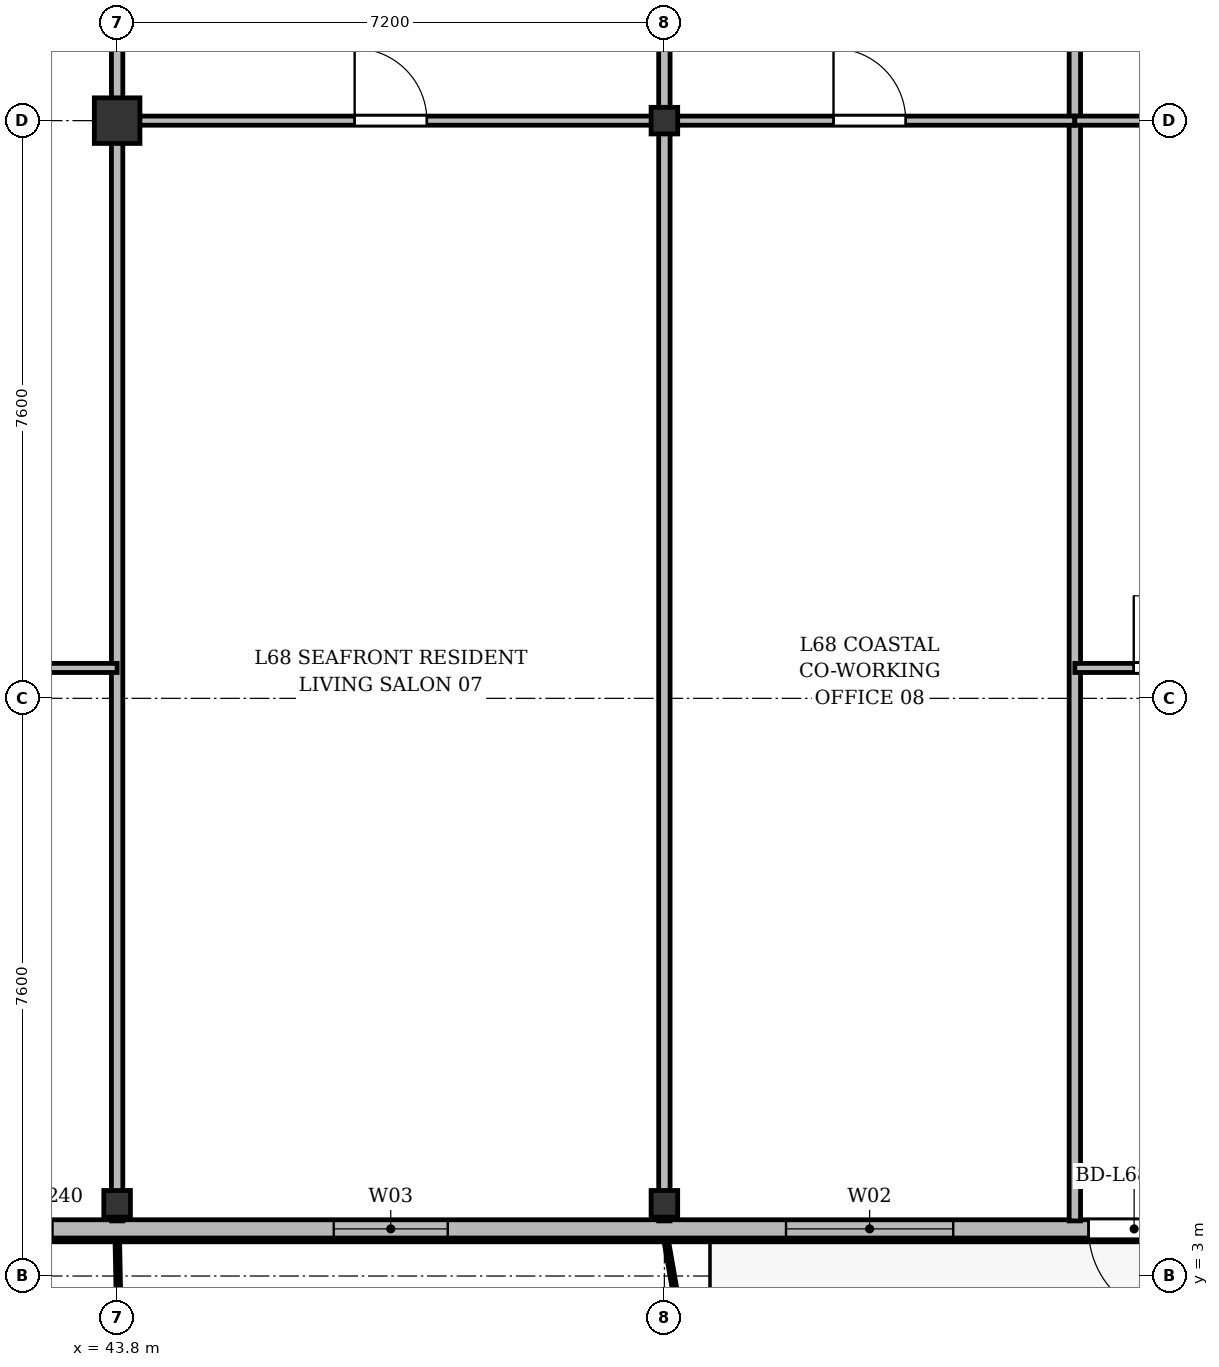
"""IFC4 building model, lengths in metres.
Left out: names, types, materials, properties, quantities, classifications, styles, units other than length and angle.
Written with IfcOpenShell. Run it as: python <this file> out.ifc"""

import sys

from ifc_helpers import new_model, si_unit, direction, frame, frame_2d, origin, origin_2d, place, context, subcontext, project, spatial, rectangle, i_section, extrude, source, transform, mapped, element, fill, save


model = new_model("IFC4")
c1 = context("Model", 3, precision=1e-05, world=origin(), true_north=direction((0.0, 1.0)))
c2 = subcontext(c1, "Body", "Model", "MODEL_VIEW")
j1 = project(units=[si_unit("LENGTHUNIT", "METRE"), si_unit("PLANEANGLEUNIT", "RADIAN")], contexts=[c1])
p1 = place(None, origin())
s1 = spatial("IfcSite", under=j1, at=p1, CompositionType="ELEMENT")
p2 = place(p1, origin())
s2 = spatial("IfcBuilding", under=s1, at=p2, CompositionType="ELEMENT")
p3 = place(p2, frame((0.0, 0.0, 263.1)))
s3 = spatial("IfcBuildingStorey", under=s2, at=p3, CompositionType="ELEMENT", Elevation=263.1)
m1 = source(origin(), c2, "Body", "SweptSolid", [
    extrude(i_section(OverallWidth=0.35, OverallDepth=0.35, WebThickness=0.018, FlangeThickness=0.028, at=origin_2d()), origin(), (0.0, 0.0, 1.0), 3.6),
])
p4 = place(p3, frame((43.8, 3.95, 0.0), z_axis=(0.0, 0.0, 1.0), x_axis=(1.0, 0.0, 0.0)))
e1 = element("IfcColumn", 1, at=p4, inside=s3, PredefinedType="COLUMN", context=c2, shape_type="MappedRepresentation", body=[
    mapped(m1, transform((0.0, 0.0, 0.0), x_axis=(1.0, 0.0, 0.0), y_axis=(0.0, 1.0, 0.0), z_axis=(0.0, 0.0, 1.0), scale=1.0)),
])
m2 = source(origin(), c2, "Body", "SweptSolid", [
    extrude(rectangle(XDim=0.6, YDim=0.6, at=origin_2d()), origin(), (0.0, 0.0, 1.0), 3.6),
])
p5 = place(p3, frame((43.8, 18.2, 0.0), z_axis=(0.0, 0.0, 1.0), x_axis=(1.0, 0.0, 0.0)))
e2 = element("IfcColumn", 2, at=p5, inside=s3, PredefinedType="COLUMN", context=c2, shape_type="MappedRepresentation", body=[
    mapped(m2, transform((0.0, 0.0, 0.0), x_axis=(1.0, 0.0, 0.0), y_axis=(0.0, 1.0, 0.0), z_axis=(0.0, 0.0, 1.0), scale=1.0)),
])
for number, where, z_axis, x_axis in (
    (3, (51.0, 3.95, 0.0), (0.0, 0.0, 1.0), (1.0, 0.0, 0.0)),
    (4, (51.0, 18.2, 0.0), (0.0, 0.0, 1.0), (1.0, 0.0, 0.0)),
):
    element("IfcColumn", number, at=place(p3, frame(where, z_axis=z_axis, x_axis=x_axis)), inside=s3, PredefinedType="COLUMN", context=c2, shape_type="MappedRepresentation", body=[
        mapped(m1, transform((0.0, 0.0, 0.0), x_axis=(1.0, 0.0, 0.0), y_axis=(0.0, 1.0, 0.0), z_axis=(0.0, 0.0, 1.0), scale=1.0)),
    ])
p6 = place(p3, frame((63.2, 3.62, 0.0), z_axis=(0.0, 0.0, 1.0), x_axis=(-1.0, 0.0, 0.0)))
e5 = element("IfcWall", 5, at=p6, inside=s3, PredefinedType="SOLIDWALL", context=c2, shape_type="SweptSolid", body=[
    extrude(rectangle(XDim=52.0, YDim=0.24, at=frame_2d((26.0, 0.0))), origin(), (0.0, 0.0, 1.0), 3.37),
])
p7 = place(p6, frame((0.345, 0.0, 0.9)))
e6 = element("IfcOpeningElement", 6, at=p7, cuts=e5, PredefinedType="OPENING", context=c2, shape_type="SweptSolid", body=[
    extrude(rectangle(XDim=1.2, YDim=1.65, at=frame_2d((0.6, 0.825))), frame((0.0, 0.13, 0.0), z_axis=(0.0, -1.0, 0.0), x_axis=(1.0, 0.0, 0.0)), (0.0, 0.0, 1.0), 0.26),
])
p8 = place(p6, frame((2.225, 0.0, 0.9)))
e7 = element("IfcOpeningElement", 7, at=p8, cuts=e5, PredefinedType="OPENING", context=c2, shape_type="SweptSolid", body=[
    extrude(rectangle(XDim=1.65, YDim=1.85, at=frame_2d((0.825, 0.925))), frame((0.0, 0.13, 0.0), z_axis=(0.0, -1.0, 0.0), x_axis=(1.0, 0.0, 0.0)), (0.0, 0.0, 1.0), 0.26),
])
p9 = place(p6, frame((5.42, 0.0, 0.0)))
e8 = element("IfcOpeningElement", 8, at=p9, cuts=e5, PredefinedType="OPENING", context=c2, shape_type="SweptSolid", body=[
    extrude(rectangle(XDim=1.2, YDim=2.2, at=frame_2d((0.6, 1.1))), frame((0.0, 0.13, 0.0), z_axis=(0.0, -1.0, 0.0), x_axis=(1.0, 0.0, 0.0)), (0.0, 0.0, 1.0), 0.26),
])
p10 = place(p6, frame((8.4, 0.0, 0.9)))
e9 = element("IfcOpeningElement", 9, at=p10, cuts=e5, PredefinedType="OPENING", context=c2, shape_type="SweptSolid", body=[
    extrude(rectangle(XDim=2.2, YDim=1.8, at=frame_2d((1.1, 0.9))), frame((0.0, 0.13, 0.0), z_axis=(0.0, -1.0, 0.0), x_axis=(1.0, 0.0, 0.0)), (0.0, 0.0, 1.0), 0.26),
])
p11 = place(p6, frame((15.05, 0.0, 0.9)))
e10 = element("IfcOpeningElement", 10, at=p11, cuts=e5, PredefinedType="OPENING", context=c2, shape_type="SweptSolid", body=[
    extrude(rectangle(XDim=1.5, YDim=1.75, at=frame_2d((0.75, 0.875))), frame((0.0, 0.13, 0.0), z_axis=(0.0, -1.0, 0.0), x_axis=(1.0, 0.0, 0.0)), (0.0, 0.0, 1.0), 0.26),
])
p12 = place(p6, frame((20.25, 0.0, 0.9)))
e11 = element("IfcOpeningElement", 11, at=p12, cuts=e5, PredefinedType="OPENING", context=c2, shape_type="SweptSolid", body=[
    extrude(rectangle(XDim=2.0, YDim=1.95, at=frame_2d((1.0, 0.975))), frame((0.0, 0.13, 0.0), z_axis=(0.0, -1.0, 0.0), x_axis=(1.0, 0.0, 0.0)), (0.0, 0.0, 1.0), 0.26),
])
p13 = place(p6, frame((24.125, 0.0, 0.9)))
e12 = element("IfcOpeningElement", 12, at=p13, cuts=e5, PredefinedType="OPENING", context=c2, shape_type="SweptSolid", body=[
    extrude(rectangle(XDim=1.65, YDim=1.85, at=frame_2d((0.825, 0.925))), frame((0.0, 0.13, 0.0), z_axis=(0.0, -1.0, 0.0), x_axis=(1.0, 0.0, 0.0)), (0.0, 0.0, 1.0), 0.26),
])
p14 = place(p6, frame((28.8, 0.0, 0.9)))
e13 = element("IfcOpeningElement", 13, at=p14, cuts=e5, PredefinedType="OPENING", context=c2, shape_type="SweptSolid", body=[
    extrude(rectangle(XDim=1.8, YDim=1.8, at=frame_2d((0.9, 0.9))), frame((0.0, 0.13, 0.0), z_axis=(0.0, -1.0, 0.0), x_axis=(1.0, 0.0, 0.0)), (0.0, 0.0, 1.0), 0.26),
])
p15 = place(p6, frame((34.078, 0.0, 0.0)))
e14 = element("IfcOpeningElement", 14, at=p15, cuts=e5, PredefinedType="OPENING", context=c2, shape_type="SweptSolid", body=[
    extrude(rectangle(XDim=1.2, YDim=2.2, at=frame_2d((0.6, 1.1))), frame((0.0, 0.13, 0.0), z_axis=(0.0, -1.0, 0.0), x_axis=(1.0, 0.0, 0.0)), (0.0, 0.0, 1.0), 0.26),
])
p16 = place(p6, frame((37.25, 0.0, 0.9)))
e15 = element("IfcOpeningElement", 15, at=p16, cuts=e5, PredefinedType="OPENING", context=c2, shape_type="SweptSolid", body=[
    extrude(rectangle(XDim=1.5, YDim=1.75, at=frame_2d((0.75, 0.875))), frame((0.0, 0.13, 0.0), z_axis=(0.0, -1.0, 0.0), x_axis=(1.0, 0.0, 0.0)), (0.0, 0.0, 1.0), 0.26),
])
p17 = place(p6, frame((40.9, 0.0, 0.9)))
e16 = element("IfcOpeningElement", 16, at=p17, cuts=e5, PredefinedType="OPENING", context=c2, shape_type="SweptSolid", body=[
    extrude(rectangle(XDim=2.0, YDim=1.95, at=frame_2d((1.0, 0.975))), frame((0.0, 0.13, 0.0), z_axis=(0.0, -1.0, 0.0), x_axis=(1.0, 0.0, 0.0)), (0.0, 0.0, 1.0), 0.26),
])
p18 = place(p6, frame((44.19, 0.0, 0.9)))
e17 = element("IfcOpeningElement", 17, at=p18, cuts=e5, PredefinedType="OPENING", context=c2, shape_type="SweptSolid", body=[
    extrude(rectangle(XDim=1.65, YDim=1.85, at=frame_2d((0.825, 0.925))), frame((0.0, 0.13, 0.0), z_axis=(0.0, -1.0, 0.0), x_axis=(1.0, 0.0, 0.0)), (0.0, 0.0, 1.0), 0.26),
])
p19 = place(p6, frame((49.855, 0.0, 0.9)))
e18 = element("IfcOpeningElement", 18, at=p19, cuts=e5, PredefinedType="OPENING", context=c2, shape_type="SweptSolid", body=[
    extrude(rectangle(XDim=1.8, YDim=1.8, at=frame_2d((0.9, 0.9))), frame((0.0, 0.13, 0.0), z_axis=(0.0, -1.0, 0.0), x_axis=(1.0, 0.0, 0.0)), (0.0, 0.0, 1.0), 0.26),
])
for number, where, z_axis, x_axis in (
    (19, (43.8, 3.725, 0.0), (0.0, 0.0, 1.0), (0.0, 1.0, 0.0)),
    (20, (51.0, 3.725, 0.0), (0.0, 0.0, 1.0), (0.0, 1.0, 0.0)),
):
    element("IfcWall", number, at=place(p3, frame(where, z_axis=z_axis, x_axis=x_axis)), inside=s3, PredefinedType="PARTITIONING", context=c2, shape_type="SweptSolid", body=[
        extrude(rectangle(XDim=27.275, YDim=0.15, at=frame_2d((13.637, 0.0))), origin(), (0.0, 0.0, 1.0), 2.87),
    ])
p20 = place(p3, frame((56.4, 3.725, 0.0), z_axis=(0.0, 0.0, 1.0), x_axis=(0.0, 1.0, 0.0)))
e21 = element("IfcWall", 21, at=p20, inside=s3, PredefinedType="PARTITIONING", context=c2, shape_type="SweptSolid", body=[
    extrude(rectangle(XDim=27.275, YDim=0.15, at=frame_2d((13.637, 0.0))), origin(), (0.0, 0.0, 1.0), 2.92),
])
p21 = place(p3, frame((40.1, 11.0, 0.0), z_axis=(0.0, 0.0, 1.0), x_axis=(1.0, 0.0, 0.0)))
e22 = element("IfcWall", 22, at=p21, inside=s3, PredefinedType="PARTITIONING", context=c2, shape_type="SweptSolid", body=[
    extrude(rectangle(XDim=3.7, YDim=0.12, at=frame_2d((1.85, 0.0))), origin(), (0.0, 0.0, 1.0), 2.87),
])
p22 = place(p21, frame((1.285, 0.0, 0.0)))
e23 = element("IfcOpeningElement", 23, at=p22, cuts=e22, PredefinedType="OPENING", context=c2, shape_type="SweptSolid", body=[
    extrude(rectangle(XDim=0.95, YDim=2.15, at=frame_2d((0.475, 1.075))), frame((0.0, 0.07, 0.0), z_axis=(0.0, -1.0, 0.0), x_axis=(1.0, 0.0, 0.0)), (0.0, 0.0, 1.0), 0.14),
])
p23 = place(p3, frame((43.8, 18.2, 0.0), z_axis=(0.0, 0.0, 1.0), x_axis=(1.0, 0.0, 0.0)))
e24 = element("IfcWall", 24, at=p23, inside=s3, PredefinedType="PARTITIONING", context=c2, shape_type="SweptSolid", body=[
    extrude(rectangle(XDim=7.2, YDim=0.12, at=frame_2d((3.6, 0.0))), origin(), (0.0, 0.0, 1.0), 2.92),
])
p24 = place(p23, frame((3.125, 0.0, 0.0)))
e25 = element("IfcOpeningElement", 25, at=p24, cuts=e24, PredefinedType="OPENING", context=c2, shape_type="SweptSolid", body=[
    extrude(rectangle(XDim=0.95, YDim=2.15, at=frame_2d((0.475, 1.075))), frame((0.0, 0.07, 0.0), z_axis=(0.0, -1.0, 0.0), x_axis=(1.0, 0.0, 0.0)), (0.0, 0.0, 1.0), 0.14),
])
p25 = place(p3, frame((51.0, 18.2, 0.0), z_axis=(0.0, 0.0, 1.0), x_axis=(1.0, 0.0, 0.0)))
e26 = element("IfcWall", 26, at=p25, inside=s3, PredefinedType="PARTITIONING", context=c2, shape_type="SweptSolid", body=[
    extrude(rectangle(XDim=5.4, YDim=0.12, at=frame_2d((2.7, 0.0))), origin(), (0.0, 0.0, 1.0), 2.92),
])
p26 = place(p25, frame((2.225, 0.0, 0.0)))
e27 = element("IfcOpeningElement", 27, at=p26, cuts=e26, PredefinedType="OPENING", context=c2, shape_type="SweptSolid", body=[
    extrude(rectangle(XDim=0.95, YDim=2.15, at=frame_2d((0.475, 1.075))), frame((0.0, 0.07, 0.0), z_axis=(0.0, -1.0, 0.0), x_axis=(1.0, 0.0, 0.0)), (0.0, 0.0, 1.0), 0.14),
])
p27 = place(p3, frame((56.4, 18.2, 0.0), z_axis=(0.0, 0.0, 1.0), x_axis=(1.0, 0.0, 0.0)))
e28 = element("IfcWall", 28, at=p27, inside=s3, PredefinedType="PARTITIONING", context=c2, shape_type="SweptSolid", body=[
    extrude(rectangle(XDim=5.0, YDim=0.12, at=frame_2d((2.5, 0.0))), origin(), (0.0, 0.0, 1.0), 2.92),
])
p28 = place(p27, frame((3.487, 0.0, 0.0)))
e29 = element("IfcOpeningElement", 29, at=p28, cuts=e28, PredefinedType="OPENING", context=c2, shape_type="SweptSolid", body=[
    extrude(rectangle(XDim=0.95, YDim=2.15, at=frame_2d((0.475, 1.075))), frame((0.0, 0.07, 0.0), z_axis=(0.0, -1.0, 0.0), x_axis=(1.0, 0.0, 0.0)), (0.0, 0.0, 1.0), 0.14),
])
p29 = place(p3, frame((56.4, 11.0, 0.0), z_axis=(0.0, 0.0, 1.0), x_axis=(1.0, 0.0, 0.0)))
e30 = element("IfcWall", 30, at=p29, inside=s3, PredefinedType="PARTITIONING", context=c2, shape_type="SweptSolid", body=[
    extrude(rectangle(XDim=2.5, YDim=0.12, at=frame_2d((1.25, 0.0))), origin(), (0.0, 0.0, 1.0), 2.87),
])
p30 = place(p29, frame((0.775, 0.0, 0.0)))
e31 = element("IfcOpeningElement", 31, at=p30, cuts=e30, PredefinedType="OPENING", context=c2, shape_type="SweptSolid", body=[
    extrude(rectangle(XDim=0.95, YDim=2.15, at=frame_2d((0.475, 1.075))), frame((0.0, 0.07, 0.0), z_axis=(0.0, -1.0, 0.0), x_axis=(1.0, 0.0, 0.0)), (0.0, 0.0, 1.0), 0.14),
])
m3 = source(origin(), c2, "Body", "SweptSolid", [
    extrude(rectangle(XDim=1.2, YDim=2.2, at=frame_2d((0.6, 1.1))), frame((0.0, 0.025, 0.0), z_axis=(0.0, -1.0, 0.0), x_axis=(1.0, 0.0, 0.0)), (0.0, 0.0, 1.0), 0.05),
])
p31 = place(p9, origin())
e32 = element("IfcDoor", 32, at=p31, inside=s3, OperationType="SINGLE_SWING_LEFT", PredefinedType="DOOR", context=c2, shape_type="MappedRepresentation", body=[
    mapped(m3, transform((0.0, 0.0, 0.0), x_axis=(1.0, 0.0, 0.0), y_axis=(0.0, 1.0, 0.0), z_axis=(0.0, 0.0, 1.0), scale=1.0)),
])
fill(e8, e32)
m4 = source(origin(), c2, "Body", "SweptSolid", [
    extrude(rectangle(XDim=2.2, YDim=1.8, at=frame_2d((1.1, 0.9))), frame((0.0, 0.03, 0.0), z_axis=(0.0, -1.0, 0.0), x_axis=(1.0, 0.0, 0.0)), (0.0, 0.0, 1.0), 0.06),
])
p32 = place(p10, origin())
e33 = element("IfcWindow", 33, at=p32, inside=s3, PartitioningType="SINGLE_PANEL", PredefinedType="WINDOW", context=c2, shape_type="MappedRepresentation", body=[
    mapped(m4, transform((0.0, 0.0, 0.0), x_axis=(1.0, 0.0, 0.0), y_axis=(0.0, 1.0, 0.0), z_axis=(0.0, 0.0, 1.0), scale=1.0)),
])
fill(e9, e33)
m5 = source(origin(), c2, "Body", "SweptSolid", [
    extrude(rectangle(XDim=1.5, YDim=1.75, at=frame_2d((0.75, 0.875))), frame((0.0, 0.03, 0.0), z_axis=(0.0, -1.0, 0.0), x_axis=(1.0, 0.0, 0.0)), (0.0, 0.0, 1.0), 0.06),
])
p33 = place(p11, origin())
e34 = element("IfcWindow", 34, at=p33, inside=s3, PartitioningType="SINGLE_PANEL", PredefinedType="WINDOW", context=c2, shape_type="MappedRepresentation", body=[
    mapped(m5, transform((0.0, 0.0, 0.0), x_axis=(1.0, 0.0, 0.0), y_axis=(0.0, 1.0, 0.0), z_axis=(0.0, 0.0, 1.0), scale=1.0)),
])
fill(e10, e34)
m6 = source(origin(), c2, "Body", "SweptSolid", [
    extrude(rectangle(XDim=0.95, YDim=2.15, at=frame_2d((0.475, 1.075))), frame((0.0, 0.025, 0.0), z_axis=(0.0, -1.0, 0.0), x_axis=(1.0, 0.0, 0.0)), (0.0, 0.0, 1.0), 0.05),
])
p34 = place(p24, origin())
e35 = element("IfcDoor", 35, at=p34, inside=s3, OperationType="SINGLE_SWING_LEFT", PredefinedType="DOOR", context=c2, shape_type="MappedRepresentation", body=[
    mapped(m6, transform((0.0, 0.0, 0.0), x_axis=(1.0, 0.0, 0.0), y_axis=(0.0, 1.0, 0.0), z_axis=(0.0, 0.0, 1.0), scale=1.0)),
])
fill(e25, e35)
p35 = place(p26, origin())
e36 = element("IfcDoor", 36, at=p35, inside=s3, OperationType="SINGLE_SWING_LEFT", PredefinedType="DOOR", context=c2, shape_type="MappedRepresentation", body=[
    mapped(m6, transform((0.0, 0.0, 0.0), x_axis=(1.0, 0.0, 0.0), y_axis=(0.0, 1.0, 0.0), z_axis=(0.0, 0.0, 1.0), scale=1.0)),
])
fill(e27, e36)
p36 = place(p30, origin())
e37 = element("IfcDoor", 37, at=p36, inside=s3, OperationType="SINGLE_SWING_LEFT", PredefinedType="DOOR", context=c2, shape_type="MappedRepresentation", body=[
    mapped(m6, transform((0.0, 0.0, 0.0), x_axis=(1.0, 0.0, 0.0), y_axis=(0.0, 1.0, 0.0), z_axis=(0.0, 0.0, 1.0), scale=1.0)),
])
fill(e31, e37)
save(model, sys.argv[1])
